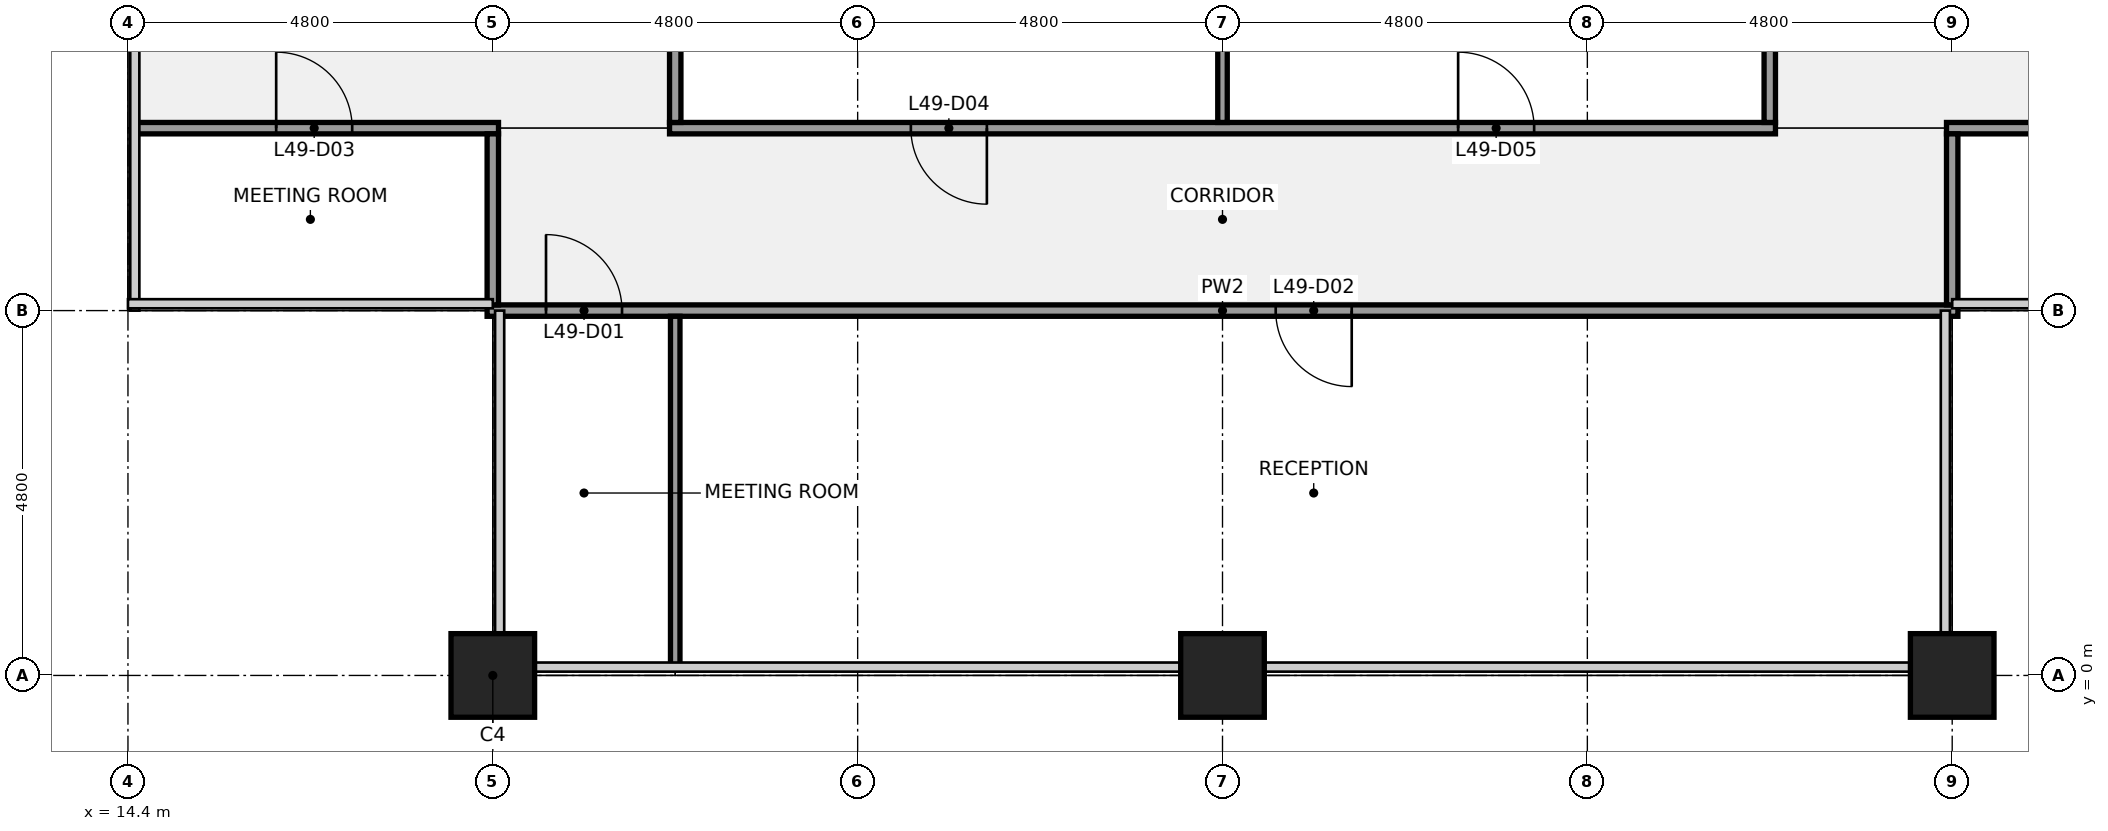
"""IFC4 building model, lengths in metres.
Left out: names, types, materials, properties, quantities, classifications, styles, units other than length and angle.
Written with IfcOpenShell. Run it as: python <this file> out.ifc"""

import sys

from ifc_helpers import new_model, si_unit, direction, frame, frame_2d, origin, origin_2d, place, context, subcontext, project, spatial, rectangle, extrude, element, fill, save


model = new_model("IFC4")
c1 = context("Model", 3, precision=1e-05, world=origin(), true_north=direction((0.0, 1.0)))
c2 = subcontext(c1, "Body", "Model", "MODEL_VIEW")
j1 = project(units=[si_unit("LENGTHUNIT", "METRE"), si_unit("PLANEANGLEUNIT", "RADIAN")], contexts=[c1])
p1 = place(None, origin())
s1 = spatial("IfcSite", under=j1, at=p1, CompositionType="ELEMENT")
p2 = place(p1, origin())
s2 = spatial("IfcBuilding", under=s1, at=p2, CompositionType="ELEMENT")
p3 = place(p2, frame((0.0, 0.0, 225.2)))
s3 = spatial("IfcBuildingStorey", under=s2, at=p3, CompositionType="ELEMENT", Elevation=225.2)
for number, where, z_axis, x_axis in (
    (1, (19.2, 0.0, 0.0), (0.0, 0.0, 1.0), (1.0, 0.0, 0.0)),
    (2, (28.8, 0.0, 0.0), (0.0, 0.0, 1.0), (1.0, 0.0, 0.0)),
    (3, (38.4, 0.0, 0.0), (0.0, 0.0, 1.0), (1.0, 0.0, 0.0)),
):
    element("IfcColumn", number, at=place(p3, frame(where, z_axis=z_axis, x_axis=x_axis)), inside=s3, PredefinedType="COLUMN", context=c2, shape_type="SweptSolid", body=[
        extrude(rectangle(XDim=1.1, YDim=1.1, at=origin_2d()), origin(), (0.0, 0.0, 1.0), 4.0),
    ])
p4 = place(p3, frame((19.125, 4.8, 0.0), z_axis=(0.0, 0.0, 1.0), x_axis=(1.0, 0.0, 0.0)))
e4 = element("IfcWall", 4, at=p4, inside=s3, PredefinedType="PARTITIONING", context=c2, shape_type="SweptSolid", body=[
    extrude(rectangle(XDim=19.35, YDim=0.15, at=frame_2d((9.675, 0.0))), origin(), (0.0, 0.0, 1.0), 2.87),
])
p5 = place(p4, frame((0.775, 0.0, 0.0)))
e5 = element("IfcOpeningElement", 5, at=p5, cuts=e4, PredefinedType="OPENING", context=c2, shape_type="SweptSolid", body=[
    extrude(rectangle(XDim=1.0, YDim=2.1, at=frame_2d((0.5, 1.05))), frame((0.0, 0.085, 0.0), z_axis=(0.0, -1.0, 0.0), x_axis=(1.0, 0.0, 0.0)), (0.0, 0.0, 1.0), 0.17),
])
p6 = place(p4, frame((10.375, 0.0, 0.0)))
e6 = element("IfcOpeningElement", 6, at=p6, cuts=e4, PredefinedType="OPENING", context=c2, shape_type="SweptSolid", body=[
    extrude(rectangle(XDim=1.0, YDim=2.1, at=frame_2d((0.5, 1.05))), frame((0.0, 0.085, 0.0), z_axis=(0.0, -1.0, 0.0), x_axis=(1.0, 0.0, 0.0)), (0.0, 0.0, 1.0), 0.17),
])
p7 = place(p3, frame((14.5, 7.2, 0.0), z_axis=(0.0, 0.0, 1.0), x_axis=(1.0, 0.0, 0.0)))
e7 = element("IfcWall", 7, at=p7, inside=s3, PredefinedType="PARTITIONING", context=c2, shape_type="SweptSolid", body=[
    extrude(rectangle(XDim=4.775, YDim=0.15, at=frame_2d((2.387, 0.0))), origin(), (0.0, 0.0, 1.0), 2.87),
])
p8 = place(p7, frame((1.85, 0.0, 0.0)))
e8 = element("IfcOpeningElement", 8, at=p8, cuts=e7, PredefinedType="OPENING", context=c2, shape_type="SweptSolid", body=[
    extrude(rectangle(XDim=1.0, YDim=2.1, at=frame_2d((0.5, 1.05))), frame((0.0, 0.085, 0.0), z_axis=(0.0, -1.0, 0.0), x_axis=(1.0, 0.0, 0.0)), (0.0, 0.0, 1.0), 0.17),
])
p9 = place(p3, frame((21.525, 7.2, 0.0), z_axis=(0.0, 0.0, 1.0), x_axis=(1.0, 0.0, 0.0)))
e9 = element("IfcWall", 9, at=p9, inside=s3, PredefinedType="PARTITIONING", context=c2, shape_type="SweptSolid", body=[
    extrude(rectangle(XDim=14.55, YDim=0.15, at=frame_2d((7.275, 0.0))), origin(), (0.0, 0.0, 1.0), 2.87),
])
p10 = place(p9, frame((3.175, 0.0, 0.0)))
e10 = element("IfcOpeningElement", 10, at=p10, cuts=e9, PredefinedType="OPENING", context=c2, shape_type="SweptSolid", body=[
    extrude(rectangle(XDim=1.0, YDim=2.1, at=frame_2d((0.5, 1.05))), frame((0.0, 0.085, 0.0), z_axis=(0.0, -1.0, 0.0), x_axis=(1.0, 0.0, 0.0)), (0.0, 0.0, 1.0), 0.17),
])
p11 = place(p9, frame((10.375, 0.0, 0.0)))
e11 = element("IfcOpeningElement", 11, at=p11, cuts=e9, PredefinedType="OPENING", context=c2, shape_type="SweptSolid", body=[
    extrude(rectangle(XDim=1.0, YDim=2.1, at=frame_2d((0.5, 1.05))), frame((0.0, 0.085, 0.0), z_axis=(0.0, -1.0, 0.0), x_axis=(1.0, 0.0, 0.0)), (0.0, 0.0, 1.0), 0.17),
])
p12 = place(p3, frame((38.325, 7.2, 0.0), z_axis=(0.0, 0.0, 1.0), x_axis=(1.0, 0.0, 0.0)))
e12 = element("IfcWall", 12, at=p12, inside=s3, PredefinedType="PARTITIONING", context=c2, shape_type="SweptSolid", body=[
    extrude(rectangle(XDim=4.95, YDim=0.15, at=frame_2d((2.475, 0.0))), origin(), (0.0, 0.0, 1.0), 2.87),
])
p13 = place(p12, frame((1.975, 0.0, 0.0)))
e13 = element("IfcOpeningElement", 13, at=p13, cuts=e12, PredefinedType="OPENING", context=c2, shape_type="SweptSolid", body=[
    extrude(rectangle(XDim=1.0, YDim=2.1, at=frame_2d((0.5, 1.05))), frame((0.0, 0.085, 0.0), z_axis=(0.0, -1.0, 0.0), x_axis=(1.0, 0.0, 0.0)), (0.0, 0.0, 1.0), 0.17),
])
p14 = place(p3, frame((19.2, 4.875, 0.0), z_axis=(0.0, 0.0, 1.0), x_axis=(0.0, 1.0, 0.0)))
e14 = element("IfcWall", 14, at=p14, inside=s3, PredefinedType="PARTITIONING", context=c2, shape_type="SweptSolid", body=[
    extrude(rectangle(XDim=2.25, YDim=0.15, at=frame_2d((1.125, 0.0))), origin(), (0.0, 0.0, 1.0), 2.87),
])
p15 = place(p3, frame((21.6, 0.1, 0.0), z_axis=(0.0, 0.0, 1.0), x_axis=(0.0, 1.0, 0.0)))
e15 = element("IfcWall", 15, at=p15, inside=s3, PredefinedType="PARTITIONING", context=c2, shape_type="SweptSolid", body=[
    extrude(rectangle(XDim=4.625, YDim=0.125, at=frame_2d((2.312, 0.0))), origin(), (0.0, 0.0, 1.0), 2.87),
])
p16 = place(p3, frame((21.6, 7.275, 0.0), z_axis=(0.0, 0.0, 1.0), x_axis=(0.0, 1.0, 0.0)))
e16 = element("IfcWall", 16, at=p16, inside=s3, PredefinedType="PARTITIONING", context=c2, shape_type="SweptSolid", body=[
    extrude(rectangle(XDim=5.863, YDim=0.15, at=frame_2d((2.931, 0.0))), origin(), (0.0, 0.0, 1.0), 2.87),
])
p17 = place(p3, frame((28.8, 7.275, 0.0), z_axis=(0.0, 0.0, 1.0), x_axis=(0.0, 1.0, 0.0)))
e17 = element("IfcWall", 17, at=p17, inside=s3, PredefinedType="PARTITIONING", context=c2, shape_type="SweptSolid", body=[
    extrude(rectangle(XDim=5.863, YDim=0.125, at=frame_2d((2.931, 0.0))), origin(), (0.0, 0.0, 1.0), 2.87),
])
p18 = place(p3, frame((36.0, 7.275, 0.0), z_axis=(0.0, 0.0, 1.0), x_axis=(0.0, 1.0, 0.0)))
e18 = element("IfcWall", 18, at=p18, inside=s3, PredefinedType="PARTITIONING", context=c2, shape_type="SweptSolid", body=[
    extrude(rectangle(XDim=5.863, YDim=0.15, at=frame_2d((2.931, 0.0))), origin(), (0.0, 0.0, 1.0), 2.87),
])
p19 = place(p3, frame((38.4, 4.875, 0.0), z_axis=(0.0, 0.0, 1.0), x_axis=(0.0, 1.0, 0.0)))
e19 = element("IfcWall", 19, at=p19, inside=s3, PredefinedType="PARTITIONING", context=c2, shape_type="SweptSolid", body=[
    extrude(rectangle(XDim=2.25, YDim=0.15, at=frame_2d((1.125, 0.0))), origin(), (0.0, 0.0, 1.0), 2.87),
])
for number, where, z_axis, x_axis in (
    (20, (19.2, -1.025, 0.0), (0.0, 0.0, 1.0), (1.0, 0.0, 0.0)),
    (21, (38.4, -1.025, 0.0), (0.0, 0.0, 1.0), (1.0, 0.0, 0.0)),
):
    element("IfcColumn", number, at=place(p3, frame(where, z_axis=z_axis, x_axis=x_axis)), inside=s3, PredefinedType="PILASTER", context=c2, shape_type="SweptSolid", body=[
        extrude(rectangle(XDim=2.4, YDim=0.95, at=origin_2d()), origin(), (0.0, 0.0, 1.0), 4.0),
    ])
p20 = place(p5, origin())
e22 = element("IfcDoor", 22, at=p20, inside=s3, OperationType="SINGLE_SWING_LEFT", PredefinedType="DOOR", context=c2, shape_type="SweptSolid", body=[
    extrude(rectangle(XDim=1.0, YDim=2.1, at=frame_2d((0.5, 1.05))), frame((0.0, 0.025, 0.0), z_axis=(0.0, -1.0, 0.0), x_axis=(1.0, 0.0, 0.0)), (0.0, 0.0, 1.0), 0.05),
])
fill(e5, e22)
p21 = place(p6, origin())
e23 = element("IfcDoor", 23, at=p21, inside=s3, OperationType="SINGLE_SWING_RIGHT", PredefinedType="DOOR", context=c2, shape_type="SweptSolid", body=[
    extrude(rectangle(XDim=1.0, YDim=2.1, at=frame_2d((0.5, 1.05))), frame((0.0, 0.025, 0.0), z_axis=(0.0, -1.0, 0.0), x_axis=(1.0, 0.0, 0.0)), (0.0, 0.0, 1.0), 0.05),
])
fill(e6, e23)
p22 = place(p8, origin())
e24 = element("IfcDoor", 24, at=p22, inside=s3, OperationType="SINGLE_SWING_LEFT", PredefinedType="DOOR", context=c2, shape_type="SweptSolid", body=[
    extrude(rectangle(XDim=1.0, YDim=2.1, at=frame_2d((0.5, 1.05))), frame((0.0, 0.025, 0.0), z_axis=(0.0, -1.0, 0.0), x_axis=(1.0, 0.0, 0.0)), (0.0, 0.0, 1.0), 0.05),
])
fill(e8, e24)
p23 = place(p10, origin())
e25 = element("IfcDoor", 25, at=p23, inside=s3, OperationType="SINGLE_SWING_RIGHT", PredefinedType="DOOR", context=c2, shape_type="SweptSolid", body=[
    extrude(rectangle(XDim=1.0, YDim=2.1, at=frame_2d((0.5, 1.05))), frame((0.0, 0.025, 0.0), z_axis=(0.0, -1.0, 0.0), x_axis=(1.0, 0.0, 0.0)), (0.0, 0.0, 1.0), 0.05),
])
fill(e10, e25)
p24 = place(p11, origin())
e26 = element("IfcDoor", 26, at=p24, inside=s3, OperationType="SINGLE_SWING_LEFT", PredefinedType="DOOR", context=c2, shape_type="SweptSolid", body=[
    extrude(rectangle(XDim=1.0, YDim=2.1, at=frame_2d((0.5, 1.05))), frame((0.0, 0.025, 0.0), z_axis=(0.0, -1.0, 0.0), x_axis=(1.0, 0.0, 0.0)), (0.0, 0.0, 1.0), 0.05),
])
fill(e11, e26)
save(model, sys.argv[1])
